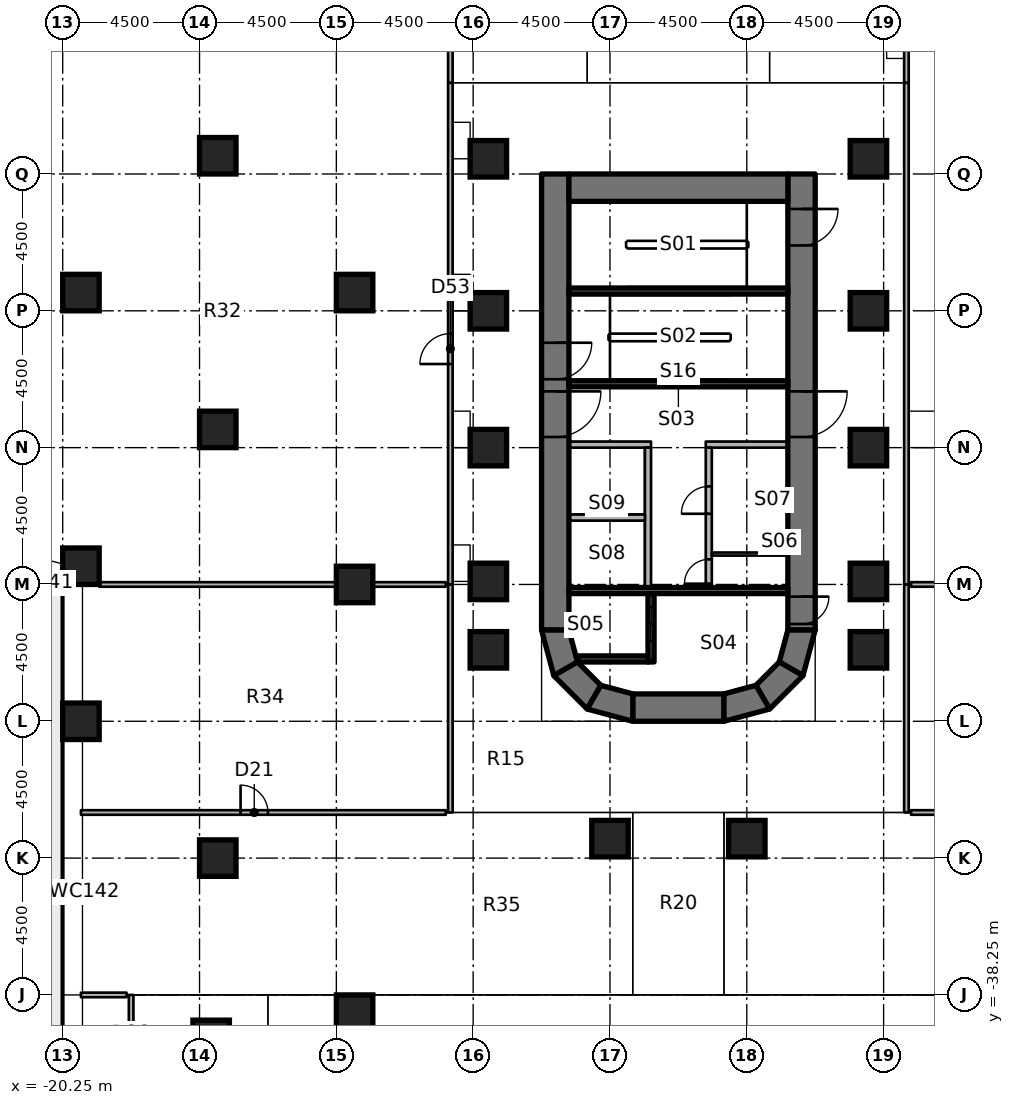
"""IFC4 building model, lengths in metres.
Left out: names, types, materials, properties, quantities, classifications, styles, units other than length and angle.
Written with IfcOpenShell. Run it as: python <this file> out.ifc"""

import sys

from ifc_helpers import new_model, si_unit, direction, frame, frame_2d, origin, origin_2d, place, context, subcontext, project, spatial, polyline, rectangle, outline, extrude, element, fill, save


model = new_model("IFC4")
c1 = context("Model", 3, precision=1e-05, world=origin(), true_north=direction((0.0, 1.0)))
c2 = subcontext(c1, "Body", "Model", "MODEL_VIEW")
j1 = project(units=[si_unit("LENGTHUNIT", "METRE"), si_unit("PLANEANGLEUNIT", "RADIAN")], contexts=[c1])
p1 = place(None, origin())
s1 = spatial("IfcSite", under=j1, at=p1, CompositionType="ELEMENT")
p2 = place(p1, origin())
s2 = spatial("IfcBuilding", under=s1, at=p2, CompositionType="ELEMENT")
p3 = place(p2, frame((0.0, 0.0, 12.0)))
s3 = spatial("IfcBuildingStorey", under=s2, at=p3, CompositionType="ELEMENT", Elevation=12.0)
for number, where, z_axis, x_axis in (
    (1, (-19.65, -29.25, 0.0), (0.0, 0.0, 1.0), (1.0, 0.0, 0.0)),
    (2, (-19.65, -24.15, 0.0), (0.0, 0.0, 1.0), (1.0, 0.0, 0.0)),
    (3, (-19.65, -15.15, 0.0), (0.0, 0.0, 1.0), (1.0, 0.0, 0.0)),
    (4, (-15.367, -39.68, 0.0), (0.0, 0.0, 1.0), (1.0, 0.0, 0.0)),
    (5, (-15.15, -33.75, 0.0), (0.0, 0.0, 1.0), (1.0, 0.0, 0.0)),
    (6, (-15.15, -19.65, 0.0), (0.0, 0.0, 1.0), (1.0, 0.0, 0.0)),
    (7, (-15.15, -10.65, 0.0), (0.0, 0.0, 1.0), (1.0, 0.0, 0.0)),
    (8, (-10.65, -38.85, 0.0), (0.0, 0.0, 1.0), (1.0, 0.0, 0.0)),
    (9, (-10.65, -24.75, 0.0), (0.0, 0.0, 1.0), (1.0, 0.0, 0.0)),
    (10, (-10.65, -15.15, 0.0), (0.0, 0.0, 1.0), (1.0, 0.0, 0.0)),
    (11, (-6.25, -26.9, 0.0), (0.0, 0.0, 1.0), (1.0, 0.0, 0.0)),
    (12, (-6.25, -24.65, 0.0), (0.0, 0.0, 1.0), (1.0, 0.0, 0.0)),
    (13, (-6.25, -20.25, 0.0), (0.0, 0.0, 1.0), (1.0, 0.0, 0.0)),
    (14, (-6.25, -15.75, 0.0), (0.0, 0.0, 1.0), (1.0, 0.0, 0.0)),
    (15, (-6.25, -10.75, 0.0), (0.0, 0.0, 1.0), (1.0, 0.0, 0.0)),
    (16, (-2.25, -33.11, 0.0), (0.0, 0.0, 1.0), (1.0, 0.0, 0.0)),
    (17, (2.25, -33.11, 0.0), (0.0, 0.0, 1.0), (1.0, 0.0, 0.0)),
    (18, (6.25, -26.9, 0.0), (0.0, 0.0, 1.0), (1.0, 0.0, 0.0)),
    (19, (6.25, -24.65, 0.0), (0.0, 0.0, 1.0), (1.0, 0.0, 0.0)),
    (20, (6.25, -20.25, 0.0), (0.0, 0.0, 1.0), (1.0, 0.0, 0.0)),
    (21, (6.25, -15.75, 0.0), (0.0, 0.0, 1.0), (1.0, 0.0, 0.0)),
    (22, (6.25, -10.75, 0.0), (0.0, 0.0, 1.0), (1.0, 0.0, 0.0)),
):
    element("IfcColumn", number, at=place(p3, frame(where, z_axis=z_axis, x_axis=x_axis)), inside=s3, PredefinedType="COLUMN", context=c2, shape_type="SweptSolid", body=[
        extrude(rectangle(XDim=1.2, YDim=1.2, at=origin_2d()), origin(), (0.0, 0.0, 1.0), 4.55),
    ])
p4 = place(p3, frame((-4.05, -11.25, 0.0), z_axis=(0.0, 0.0, 1.0), x_axis=(0.0, -1.0, 0.0)))
e23 = element("IfcWall", 23, at=p4, inside=s3, PredefinedType="SHEAR", context=c2, shape_type="SweptSolid", body=[
    extrude(rectangle(XDim=15.0, YDim=0.9, at=frame_2d((7.5, 0.0))), origin(), (0.0, 0.0, 1.0), 5.0),
])
p5 = place(p4, frame((7.15, 0.0, 0.0)))
e24 = element("IfcOpeningElement", 24, at=p5, cuts=e23, PredefinedType="OPENING", context=c2, shape_type="SweptSolid", body=[
    extrude(rectangle(XDim=1.5, YDim=2.3, at=frame_2d((0.75, 1.15))), frame((0.0, 0.46, 0.0), z_axis=(0.0, -1.0, 0.0), x_axis=(1.0, 0.0, 0.0)), (0.0, 0.0, 1.0), 0.92),
])
p6 = place(p4, frame((5.55, 0.0, 0.0)))
e25 = element("IfcOpeningElement", 25, at=p6, cuts=e23, PredefinedType="OPENING", context=c2, shape_type="SweptSolid", body=[
    extrude(rectangle(XDim=1.2, YDim=2.1, at=frame_2d((0.6, 1.05))), frame((0.0, 0.46, 0.0), z_axis=(0.0, -1.0, 0.0), x_axis=(1.0, 0.0, 0.0)), (0.0, 0.0, 1.0), 0.92),
])
p7 = place(p3, frame((4.05, -11.25, 0.0), z_axis=(0.0, 0.0, 1.0), x_axis=(0.0, -1.0, 0.0)))
e26 = element("IfcWall", 26, at=p7, inside=s3, PredefinedType="SHEAR", context=c2, shape_type="SweptSolid", body=[
    extrude(rectangle(XDim=15.0, YDim=0.9, at=frame_2d((7.5, 0.0))), origin(), (0.0, 0.0, 1.0), 5.0),
])
p8 = place(p7, frame((7.15, 0.0, 0.0)))
e27 = element("IfcOpeningElement", 27, at=p8, cuts=e26, PredefinedType="OPENING", context=c2, shape_type="SweptSolid", body=[
    extrude(rectangle(XDim=1.5, YDim=2.3, at=frame_2d((0.75, 1.15))), frame((0.0, 0.46, 0.0), z_axis=(0.0, -1.0, 0.0), x_axis=(1.0, 0.0, 0.0)), (0.0, 0.0, 1.0), 0.92),
])
p9 = place(p7, frame((13.9, 0.0, 0.0)))
e28 = element("IfcOpeningElement", 28, at=p9, cuts=e26, PredefinedType="OPENING", context=c2, shape_type="SweptSolid", body=[
    extrude(rectangle(XDim=0.9, YDim=2.1, at=frame_2d((0.45, 1.05))), frame((0.0, 0.46, 0.0), z_axis=(0.0, -1.0, 0.0), x_axis=(1.0, 0.0, 0.0)), (0.0, 0.0, 1.0), 0.92),
])
p10 = place(p7, frame((1.15, 0.0, 0.0)))
e29 = element("IfcOpeningElement", 29, at=p10, cuts=e26, PredefinedType="OPENING", context=c2, shape_type="SweptSolid", body=[
    extrude(rectangle(XDim=1.2, YDim=2.1, at=frame_2d((0.6, 1.05))), frame((0.0, 0.46, 0.0), z_axis=(0.0, -1.0, 0.0), x_axis=(1.0, 0.0, 0.0)), (0.0, 0.0, 1.0), 0.92),
])
p11 = place(p3, frame((-3.6, -11.7, 0.0), z_axis=(0.0, 0.0, 1.0), x_axis=(1.0, 0.0, 0.0)))
e30 = element("IfcWall", 30, at=p11, inside=s3, PredefinedType="SHEAR", context=c2, shape_type="SweptSolid", body=[
    extrude(rectangle(XDim=7.2, YDim=0.9, at=frame_2d((3.6, 0.0))), origin(), (0.0, 0.0, 1.0), 5.0),
])
p12 = place(p3, frame((-1.5, -28.8, 0.0), z_axis=(0.0, 0.0, 1.0), x_axis=(1.0, 0.0, 0.0)))
e31 = element("IfcWall", 31, at=p12, inside=s3, PredefinedType="SHEAR", context=c2, shape_type="SweptSolid", body=[
    extrude(rectangle(XDim=3.0, YDim=0.9, at=frame_2d((1.5, 0.0))), origin(), (0.0, 0.0, 1.0), 5.0),
])
p13 = place(p3, origin())
e32 = element("IfcWall", 32, at=p13, inside=s3, PredefinedType="SHEAR", context=c2, shape_type="SweptSolid", body=[
    extrude(outline(polyline([(-4.5, -26.25), (-4.098, -27.75), (-3.319, -27.3), (-3.6, -26.25), (-4.5, -26.25)])), origin(), (0.0, 0.0, 1.0), 5.0),
])
p14 = place(p3, origin())
e33 = element("IfcWall", 33, at=p14, inside=s3, PredefinedType="SHEAR", context=c2, shape_type="SweptSolid", body=[
    extrude(outline(polyline([(-4.098, -27.75), (-3.0, -28.848), (-2.55, -28.069), (-3.319, -27.3), (-4.098, -27.75)])), origin(), (0.0, 0.0, 1.0), 5.0),
])
p15 = place(p3, origin())
e34 = element("IfcWall", 34, at=p15, inside=s3, PredefinedType="SHEAR", context=c2, shape_type="SweptSolid", body=[
    extrude(outline(polyline([(-3.0, -28.848), (-1.5, -29.25), (-1.5, -28.35), (-2.55, -28.069), (-3.0, -28.848)])), origin(), (0.0, 0.0, 1.0), 5.0),
])
p16 = place(p3, origin())
e35 = element("IfcWall", 35, at=p16, inside=s3, PredefinedType="SHEAR", context=c2, shape_type="SweptSolid", body=[
    extrude(outline(polyline([(4.5, -26.25), (4.098, -27.75), (3.319, -27.3), (3.6, -26.25), (4.5, -26.25)])), origin(), (0.0, 0.0, 1.0), 5.0),
])
p17 = place(p3, origin())
e36 = element("IfcWall", 36, at=p17, inside=s3, PredefinedType="SHEAR", context=c2, shape_type="SweptSolid", body=[
    extrude(outline(polyline([(4.098, -27.75), (3.0, -28.848), (2.55, -28.069), (3.319, -27.3), (4.098, -27.75)])), origin(), (0.0, 0.0, 1.0), 5.0),
])
p18 = place(p3, origin())
e37 = element("IfcWall", 37, at=p18, inside=s3, PredefinedType="SHEAR", context=c2, shape_type="SweptSolid", body=[
    extrude(outline(polyline([(3.0, -28.848), (1.5, -29.25), (1.5, -28.35), (2.55, -28.069), (3.0, -28.848)])), origin(), (0.0, 0.0, 1.0), 5.0),
])
p19 = place(p3, frame((3.6, -24.95, 0.0), z_axis=(0.0, 0.0, 1.0), x_axis=(-1.0, 0.0, 0.0)))
e38 = element("IfcWall", 38, at=p19, inside=s3, PredefinedType="SHEAR", context=c2, shape_type="SweptSolid", body=[
    extrude(rectangle(XDim=7.2, YDim=0.2, at=frame_2d((3.6, 0.0))), origin(), (0.0, 0.0, 1.0), 4.55),
])
p20 = place(p3, frame((-0.9, -27.3, 0.0), z_axis=(0.0, 0.0, 1.0), x_axis=(0.0, 1.0, 0.0)))
e39 = element("IfcWall", 39, at=p20, inside=s3, PredefinedType="SHEAR", context=c2, shape_type="SweptSolid", body=[
    extrude(rectangle(XDim=2.25, YDim=0.2, at=frame_2d((1.125, 0.0))), origin(), (0.0, 0.0, 1.0), 4.55),
])
p21 = place(p20, frame((0.7, 0.0, 0.0)))
e40 = element("IfcOpeningElement", 40, at=p21, cuts=e39, PredefinedType="OPENING", context=c2, shape_type="SweptSolid", body=[
    extrude(rectangle(XDim=1.1, YDim=2.3, at=frame_2d((0.55, 1.15))), frame((0.0, 0.11, 0.0), z_axis=(0.0, -1.0, 0.0), x_axis=(1.0, 0.0, 0.0)), (0.0, 0.0, 1.0), 0.22),
])
p22 = place(p3, origin())
e41 = element("IfcWall", 41, at=p22, inside=s3, PredefinedType="SHEAR", context=c2, shape_type="SweptSolid", body=[
    extrude(outline(polyline([(-1.0, -27.1), (-3.341, -27.1), (-3.291, -27.284), (-3.275, -27.3), (-1.0, -27.3), (-1.0, -27.1)])), origin(), (0.0, 0.0, 1.0), 4.55),
])
for number, where, z_axis, x_axis in (
    (42, (3.6, -18.15, 0.0), (0.0, 0.0, 1.0), (-1.0, 0.0, 0.0)),
    (43, (3.6, -15.1, 0.0), (0.0, 0.0, 1.0), (-1.0, 0.0, 0.0)),
):
    element("IfcWall", number, at=place(p3, frame(where, z_axis=z_axis, x_axis=x_axis)), inside=s3, PredefinedType="SHEAR", context=c2, shape_type="SweptSolid", body=[
        extrude(rectangle(XDim=7.2, YDim=0.2, at=frame_2d((3.6, 0.0))), origin(), (0.0, 0.0, 1.0), 4.55),
    ])
p23 = place(p3, frame((3.6, -20.15, 0.0), z_axis=(0.0, 0.0, 1.0), x_axis=(-1.0, 0.0, 0.0)))
e44 = element("IfcWall", 44, at=p23, inside=s3, PredefinedType="PARTITIONING", context=c2, shape_type="SweptSolid", body=[
    extrude(rectangle(XDim=2.7, YDim=0.2, at=frame_2d((1.35, 0.0))), origin(), (0.0, 0.0, 1.0), 4.55),
])
p24 = place(p3, frame((1.0, -24.85, 0.0), z_axis=(0.0, 0.0, 1.0), x_axis=(0.0, 1.0, 0.0)))
e45 = element("IfcWall", 45, at=p24, inside=s3, PredefinedType="PARTITIONING", context=c2, shape_type="SweptSolid", body=[
    extrude(rectangle(XDim=4.6, YDim=0.2, at=frame_2d((2.3, 0.0))), origin(), (0.0, 0.0, 1.0), 4.55),
])
p25 = place(p24, frame((0.125, 0.0, 0.0)))
e46 = element("IfcOpeningElement", 46, at=p25, cuts=e45, PredefinedType="OPENING", context=c2, shape_type="SweptSolid", body=[
    extrude(rectangle(XDim=0.8, YDim=2.1, at=frame_2d((0.4, 1.05))), frame((0.0, 0.11, 0.0), z_axis=(0.0, -1.0, 0.0), x_axis=(1.0, 0.0, 0.0)), (0.0, 0.0, 1.0), 0.22),
])
p26 = place(p24, frame((2.425, 0.0, 0.0)))
e47 = element("IfcOpeningElement", 47, at=p26, cuts=e45, PredefinedType="OPENING", context=c2, shape_type="SweptSolid", body=[
    extrude(rectangle(XDim=0.9, YDim=2.1, at=frame_2d((0.45, 1.05))), frame((0.0, 0.11, 0.0), z_axis=(0.0, -1.0, 0.0), x_axis=(1.0, 0.0, 0.0)), (0.0, 0.0, 1.0), 0.22),
])
p27 = place(p3, frame((-0.9, -20.15, 0.0), z_axis=(0.0, 0.0, 1.0), x_axis=(-1.0, 0.0, 0.0)))
e48 = element("IfcWall", 48, at=p27, inside=s3, PredefinedType="PARTITIONING", context=c2, shape_type="SweptSolid", body=[
    extrude(rectangle(XDim=2.7, YDim=0.2, at=frame_2d((1.35, 0.0))), origin(), (0.0, 0.0, 1.0), 4.55),
])
p28 = place(p3, frame((-1.0, -24.85, 0.0), z_axis=(0.0, 0.0, 1.0), x_axis=(0.0, 1.0, 0.0)))
e49 = element("IfcWall", 49, at=p28, inside=s3, PredefinedType="PARTITIONING", context=c2, shape_type="SweptSolid", body=[
    extrude(rectangle(XDim=4.6, YDim=0.2, at=frame_2d((2.3, 0.0))), origin(), (0.0, 0.0, 1.0), 4.55),
])
p29 = place(p3, frame((3.6, -23.75, 0.0), z_axis=(0.0, 0.0, 1.0), x_axis=(-1.0, 0.0, 0.0)))
e50 = element("IfcWall", 50, at=p29, inside=s3, PredefinedType="PARTITIONING", context=c2, shape_type="SweptSolid", body=[
    extrude(rectangle(XDim=2.5, YDim=0.1, at=frame_2d((1.25, 0.0))), origin(), (0.0, 0.0, 1.0), 4.55),
])
p30 = place(p3, frame((-1.1, -22.55, 0.0), z_axis=(0.0, 0.0, 1.0), x_axis=(-1.0, 0.0, 0.0)))
e51 = element("IfcWall", 51, at=p30, inside=s3, PredefinedType="PARTITIONING", context=c2, shape_type="SweptSolid", body=[
    extrude(rectangle(XDim=2.5, YDim=0.2, at=frame_2d((1.25, 0.0))), origin(), (0.0, 0.0, 1.0), 4.55),
])
p31 = place(p3, frame((-18.0, -46.63, 0.0), z_axis=(0.0, 0.0, 1.0), x_axis=(0.0, 1.0, 0.0)))
e52 = element("IfcWall", 52, at=p31, inside=s3, PredefinedType="PARTITIONING", context=c2, shape_type="SweptSolid", body=[
    extrude(rectangle(XDim=8.38, YDim=0.15, at=frame_2d((4.19, 0.0))), origin(), (0.0, 0.0, 1.0), 4.55),
])
p32 = place(p31, frame((4.63, 0.0, 0.0)))
e53 = element("IfcOpeningElement", 53, at=p32, cuts=e52, PredefinedType="OPENING", context=c2, shape_type="SweptSolid", body=[
    extrude(rectangle(XDim=0.9, YDim=2.1, at=frame_2d((0.45, 1.05))), frame((0.0, 0.085, 0.0), z_axis=(0.0, -1.0, 0.0), x_axis=(1.0, 0.0, 0.0)), (0.0, 0.0, 1.0), 0.17),
])
p33 = place(p3, frame((-19.65, -38.25, 0.0), z_axis=(0.0, 0.0, 1.0), x_axis=(1.0, 0.0, 0.0)))
e54 = element("IfcWall", 54, at=p33, inside=s3, PredefinedType="PARTITIONING", context=c2, shape_type="SweptSolid", body=[
    extrude(rectangle(XDim=1.5, YDim=0.15, at=frame_2d((0.75, 0.0))), origin(), (0.0, 0.0, 1.0), 4.55),
])
p34 = place(p3, frame((7.5, -8.25, 0.0), z_axis=(0.0, 0.0, 1.0), x_axis=(0.0, -1.0, 0.0)))
e55 = element("IfcWall", 55, at=p34, inside=s3, PredefinedType="PARTITIONING", context=c2, shape_type="SweptSolid", body=[
    extrude(rectangle(XDim=16.5, YDim=0.15, at=frame_2d((8.25, 0.0))), origin(), (0.0, 0.0, 1.0), 4.55),
])
p35 = place(p3, frame((7.5, -24.75, 0.0), z_axis=(0.0, 0.0, 1.0), x_axis=(0.0, -1.0, 0.0)))
e56 = element("IfcWall", 56, at=p35, inside=s3, PredefinedType="PARTITIONING", context=c2, shape_type="SweptSolid", body=[
    extrude(rectangle(XDim=7.5, YDim=0.15, at=frame_2d((3.75, 0.0))), origin(), (0.0, 0.0, 1.0), 4.55),
])
p36 = place(p3, frame((-7.5, -24.75, 0.0), z_axis=(0.0, 0.0, 1.0), x_axis=(0.0, 1.0, 0.0)))
e57 = element("IfcWall", 57, at=p36, inside=s3, PredefinedType="PARTITIONING", context=c2, shape_type="SweptSolid", body=[
    extrude(rectangle(XDim=16.5, YDim=0.15, at=frame_2d((8.25, 0.0))), origin(), (0.0, 0.0, 1.0), 4.55),
])
p37 = place(p36, frame((7.25, 0.0, 0.0)))
e58 = element("IfcOpeningElement", 58, at=p37, cuts=e57, PredefinedType="OPENING", context=c2, shape_type="SweptSolid", body=[
    extrude(rectangle(XDim=1.0, YDim=2.1, at=frame_2d((0.5, 1.05))), frame((0.0, 0.085, 0.0), z_axis=(0.0, -1.0, 0.0), x_axis=(1.0, 0.0, 0.0)), (0.0, 0.0, 1.0), 0.17),
])
p38 = place(p3, frame((-7.5, -32.25, 0.0), z_axis=(0.0, 0.0, 1.0), x_axis=(0.0, 1.0, 0.0)))
e59 = element("IfcWall", 59, at=p38, inside=s3, PredefinedType="PARTITIONING", context=c2, shape_type="SweptSolid", body=[
    extrude(rectangle(XDim=7.5, YDim=0.15, at=frame_2d((3.75, 0.0))), origin(), (0.0, 0.0, 1.0), 4.55),
])
p39 = place(p3, frame((14.55, -24.75, 0.0), z_axis=(0.0, 0.0, 1.0), x_axis=(-1.0, 0.0, 0.0)))
e60 = element("IfcWall", 60, at=p39, inside=s3, PredefinedType="PARTITIONING", context=c2, shape_type="SweptSolid", body=[
    extrude(rectangle(XDim=6.9, YDim=0.15, at=frame_2d((3.45, 0.0))), origin(), (0.0, 0.0, 1.0), 4.55),
])
p40 = place(p3, frame((7.5, -8.25, 0.0), z_axis=(0.0, 0.0, 1.0), x_axis=(0.0, 1.0, 0.0)))
e61 = element("IfcWall", 61, at=p40, inside=s3, PredefinedType="PARTITIONING", context=c2, shape_type="SweptSolid", body=[
    extrude(rectangle(XDim=6.6, YDim=0.15, at=frame_2d((3.3, 0.0))), origin(), (0.0, 0.0, 1.0), 4.55),
])
p41 = place(p3, frame((7.65, -32.25, 0.0), z_axis=(0.0, 0.0, 1.0), x_axis=(1.0, 0.0, 0.0)))
e62 = element("IfcWall", 62, at=p41, inside=s3, PredefinedType="PARTITIONING", context=c2, shape_type="SweptSolid", body=[
    extrude(rectangle(XDim=12.0, YDim=0.15, at=frame_2d((6.0, 0.0))), origin(), (0.0, 0.0, 1.0), 4.55),
])
p42 = place(p41, frame((5.85, 0.0, 0.0)))
e63 = element("IfcOpeningElement", 63, at=p42, cuts=e62, PredefinedType="OPENING", context=c2, shape_type="SweptSolid", body=[
    extrude(rectangle(XDim=0.9, YDim=2.1, at=frame_2d((0.45, 1.05))), frame((0.0, 0.085, 0.0), z_axis=(0.0, -1.0, 0.0), x_axis=(1.0, 0.0, 0.0)), (0.0, 0.0, 1.0), 0.17),
])
p43 = place(p3, frame((-7.65, -24.75, 0.0), z_axis=(0.0, 0.0, 1.0), x_axis=(-1.0, 0.0, 0.0)))
e64 = element("IfcWall", 64, at=p43, inside=s3, PredefinedType="PARTITIONING", context=c2, shape_type="SweptSolid", body=[
    extrude(rectangle(XDim=2.4, YDim=0.15, at=frame_2d((1.2, 0.0))), origin(), (0.0, 0.0, 1.0), 4.55),
])
p44 = place(p3, frame((-11.25, -24.75, 0.0), z_axis=(0.0, 0.0, 1.0), x_axis=(-1.0, 0.0, 0.0)))
e65 = element("IfcWall", 65, at=p44, inside=s3, PredefinedType="PARTITIONING", context=c2, shape_type="SweptSolid", body=[
    extrude(rectangle(XDim=7.8, YDim=0.15, at=frame_2d((3.9, 0.0))), origin(), (0.0, 0.0, 1.0), 4.55),
])
p45 = place(p3, frame((-7.5, -1.65, 0.0), z_axis=(0.0, 0.0, 1.0), x_axis=(0.0, -1.0, 0.0)))
e66 = element("IfcWall", 66, at=p45, inside=s3, PredefinedType="PARTITIONING", context=c2, shape_type="SweptSolid", body=[
    extrude(rectangle(XDim=6.6, YDim=0.15, at=frame_2d((3.3, 0.0))), origin(), (0.0, 0.0, 1.0), 4.55),
])
p46 = place(p3, frame((-19.65, -32.25, 0.0), z_axis=(0.0, 0.0, 1.0), x_axis=(1.0, 0.0, 0.0)))
e67 = element("IfcWall", 67, at=p46, inside=s3, PredefinedType="PARTITIONING", context=c2, shape_type="SweptSolid", body=[
    extrude(rectangle(XDim=12.0, YDim=0.15, at=frame_2d((6.0, 0.0))), origin(), (0.0, 0.0, 1.0), 4.55),
])
p47 = place(p46, frame((5.25, 0.0, 0.0)))
e68 = element("IfcOpeningElement", 68, at=p47, cuts=e67, PredefinedType="OPENING", context=c2, shape_type="SweptSolid", body=[
    extrude(rectangle(XDim=0.9, YDim=2.1, at=frame_2d((0.45, 1.05))), frame((0.0, 0.085, 0.0), z_axis=(0.0, -1.0, 0.0), x_axis=(1.0, 0.0, 0.0)), (0.0, 0.0, 1.0), 0.17),
])
p48 = place(p8, origin())
e69 = element("IfcDoor", 69, at=p48, inside=s3, OperationType="DOUBLE_DOOR_SINGLE_SWING", PredefinedType="DOOR", context=c2, shape_type="SweptSolid", body=[
    extrude(rectangle(XDim=1.5, YDim=2.3, at=frame_2d((0.75, 1.15))), frame((0.0, 0.025, 0.0), z_axis=(0.0, -1.0, 0.0), x_axis=(1.0, 0.0, 0.0)), (0.0, 0.0, 1.0), 0.05),
])
fill(e27, e69)
p49 = place(p5, origin())
e70 = element("IfcDoor", 70, at=p49, inside=s3, OperationType="DOUBLE_DOOR_SINGLE_SWING", PredefinedType="DOOR", context=c2, shape_type="SweptSolid", body=[
    extrude(rectangle(XDim=1.5, YDim=2.3, at=frame_2d((0.75, 1.15))), frame((0.0, 0.025, 0.0), z_axis=(0.0, -1.0, 0.0), x_axis=(1.0, 0.0, 0.0)), (0.0, 0.0, 1.0), 0.05),
])
fill(e24, e70)
p50 = place(p9, origin())
e71 = element("IfcDoor", 71, at=p50, inside=s3, OperationType="SINGLE_SWING_RIGHT", PredefinedType="DOOR", context=c2, shape_type="SweptSolid", body=[
    extrude(rectangle(XDim=0.9, YDim=2.1, at=frame_2d((0.45, 1.05))), frame((0.0, 0.025, 0.0), z_axis=(0.0, -1.0, 0.0), x_axis=(1.0, 0.0, 0.0)), (0.0, 0.0, 1.0), 0.05),
])
fill(e28, e71)
p51 = place(p6, origin())
e72 = element("IfcDoor", 72, at=p51, inside=s3, OperationType="SINGLE_SWING_LEFT", PredefinedType="DOOR", context=c2, shape_type="SweptSolid", body=[
    extrude(rectangle(XDim=1.2, YDim=2.1, at=frame_2d((0.6, 1.05))), frame((0.0, 0.025, 0.0), z_axis=(0.0, -1.0, 0.0), x_axis=(1.0, 0.0, 0.0)), (0.0, 0.0, 1.0), 0.05),
])
fill(e25, e72)
p52 = place(p10, origin())
e73 = element("IfcDoor", 73, at=p52, inside=s3, OperationType="SINGLE_SWING_RIGHT", PredefinedType="DOOR", context=c2, shape_type="SweptSolid", body=[
    extrude(rectangle(XDim=1.2, YDim=2.1, at=frame_2d((0.6, 1.05))), frame((0.0, 0.025, 0.0), z_axis=(0.0, -1.0, 0.0), x_axis=(1.0, 0.0, 0.0)), (0.0, 0.0, 1.0), 0.05),
])
fill(e29, e73)
p53 = place(p21, origin())
e74 = element("IfcDoor", 74, at=p53, inside=s3, OperationType="DOUBLE_DOOR_SLIDING", PredefinedType="DOOR", context=c2, shape_type="SweptSolid", body=[
    extrude(rectangle(XDim=1.1, YDim=2.3, at=frame_2d((0.55, 1.15))), frame((0.0, 0.025, 0.0), z_axis=(0.0, -1.0, 0.0), x_axis=(1.0, 0.0, 0.0)), (0.0, 0.0, 1.0), 0.05),
])
fill(e40, e74)
p54 = place(p25, origin())
e75 = element("IfcDoor", 75, at=p54, inside=s3, OperationType="SINGLE_SWING_RIGHT", PredefinedType="DOOR", context=c2, shape_type="SweptSolid", body=[
    extrude(rectangle(XDim=0.8, YDim=2.1, at=frame_2d((0.4, 1.05))), frame((0.0, 0.025, 0.0), z_axis=(0.0, -1.0, 0.0), x_axis=(1.0, 0.0, 0.0)), (0.0, 0.0, 1.0), 0.05),
])
fill(e46, e75)
p55 = place(p26, origin())
e76 = element("IfcDoor", 76, at=p55, inside=s3, OperationType="SINGLE_SWING_RIGHT", PredefinedType="DOOR", context=c2, shape_type="SweptSolid", body=[
    extrude(rectangle(XDim=0.9, YDim=2.1, at=frame_2d((0.45, 1.05))), frame((0.0, 0.025, 0.0), z_axis=(0.0, -1.0, 0.0), x_axis=(1.0, 0.0, 0.0)), (0.0, 0.0, 1.0), 0.05),
])
fill(e47, e76)
p56 = place(p37, origin())
e77 = element("IfcDoor", 77, at=p56, inside=s3, OperationType="SINGLE_SWING_LEFT", PredefinedType="DOOR", context=c2, shape_type="SweptSolid", body=[
    extrude(rectangle(XDim=1.0, YDim=2.1, at=frame_2d((0.5, 1.05))), frame((0.0, 0.025, 0.0), z_axis=(0.0, -1.0, 0.0), x_axis=(1.0, 0.0, 0.0)), (0.0, 0.0, 1.0), 0.05),
])
fill(e58, e77)
p57 = place(p47, origin())
e78 = element("IfcDoor", 78, at=p57, inside=s3, OperationType="SINGLE_SWING_LEFT", PredefinedType="DOOR", context=c2, shape_type="SweptSolid", body=[
    extrude(rectangle(XDim=0.9, YDim=2.1, at=frame_2d((0.45, 1.05))), frame((0.0, 0.025, 0.0), z_axis=(0.0, -1.0, 0.0), x_axis=(1.0, 0.0, 0.0)), (0.0, 0.0, 1.0), 0.05),
])
fill(e68, e78)
save(model, sys.argv[1])
